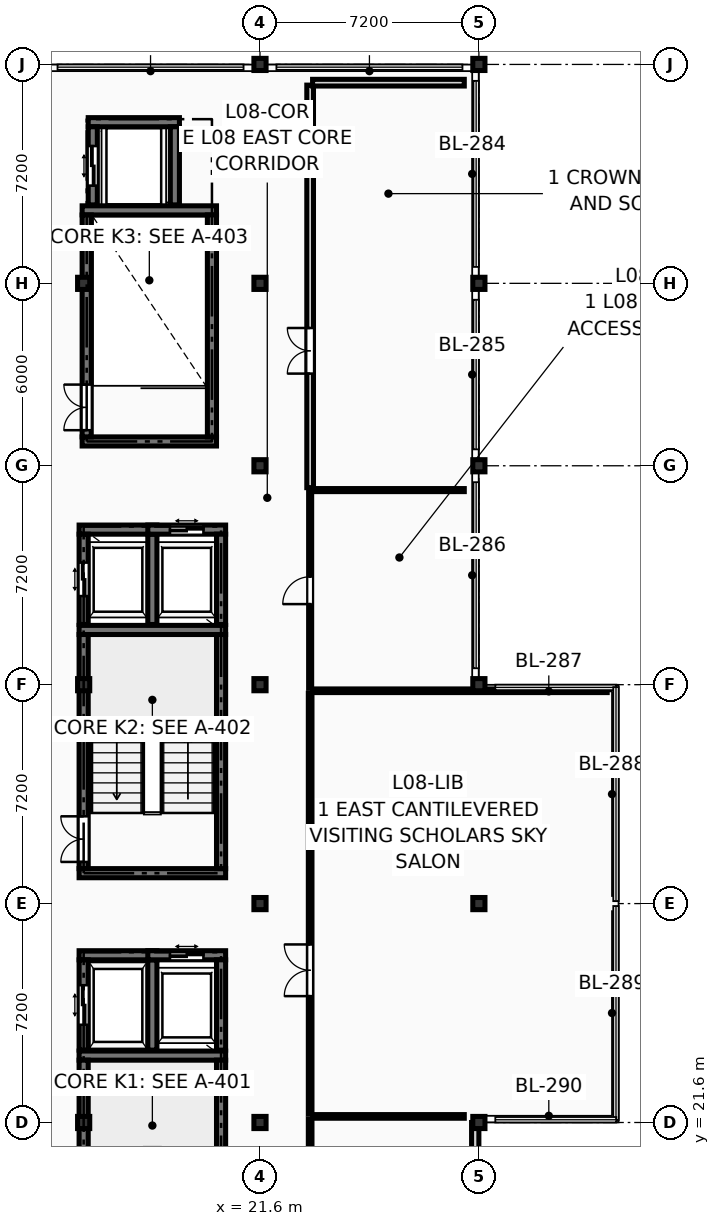
"""IFC4 building model, lengths in metres.
Left out: names, types, materials, properties, quantities, classifications, styles, units other than length and angle.
Written with IfcOpenShell. Run it as: python <this file> out.ifc"""

import sys

from ifc_helpers import new_model, si_unit, direction, frame, frame_2d, origin, origin_2d, place, context, subcontext, project, spatial, rectangle, extrude, element, fill, save


model = new_model("IFC4")
c1 = context("Model", 3, precision=1e-05, world=origin(), true_north=direction((0.0, 1.0)))
c2 = subcontext(c1, "Body", "Model", "MODEL_VIEW")
j1 = project(units=[si_unit("LENGTHUNIT", "METRE"), si_unit("PLANEANGLEUNIT", "RADIAN")], contexts=[c1])
p1 = place(None, origin())
s1 = spatial("IfcSite", under=j1, at=p1, CompositionType="ELEMENT")
p2 = place(p1, origin())
s2 = spatial("IfcBuilding", under=s1, at=p2, CompositionType="ELEMENT")
p3 = place(p2, frame((0.0, 0.0, 29.7)))
s3 = spatial("IfcBuildingStorey", under=s2, at=p3, CompositionType="ELEMENT", Elevation=29.7)
for number, where, z_axis, x_axis in (
    (1, (15.8, 21.6, 0.0), (0.0, 0.0, 1.0), (1.0, 0.0, 0.0)),
    (2, (15.8, 36.0, 0.0), (0.0, 0.0, 1.0), (1.0, 0.0, 0.0)),
    (3, (15.8, 49.2, 0.0), (0.0, 0.0, 1.0), (1.0, 0.0, 0.0)),
    (4, (21.6, 21.6, 0.0), (0.0, 0.0, 1.0), (1.0, 0.0, 0.0)),
    (5, (21.6, 28.8, 0.0), (0.0, 0.0, 1.0), (1.0, 0.0, 0.0)),
    (6, (21.6, 36.0, 0.0), (0.0, 0.0, 1.0), (1.0, 0.0, 0.0)),
    (7, (21.6, 43.2, 0.0), (0.0, 0.0, 1.0), (1.0, 0.0, 0.0)),
    (8, (21.6, 49.2, 0.0), (0.0, 0.0, 1.0), (1.0, 0.0, 0.0)),
    (9, (21.6, 56.4, 0.0), (0.0, 0.0, 1.0), (1.0, 0.0, 0.0)),
    (10, (28.8, 21.6, 0.0), (0.0, 0.0, 1.0), (1.0, 0.0, 0.0)),
    (11, (28.8, 28.8, 0.0), (0.0, 0.0, 1.0), (1.0, 0.0, 0.0)),
    (12, (28.8, 36.0, 0.0), (0.0, 0.0, 1.0), (1.0, 0.0, 0.0)),
    (13, (28.8, 43.2, 0.0), (0.0, 0.0, 1.0), (1.0, 0.0, 0.0)),
    (14, (28.8, 49.2, 0.0), (0.0, 0.0, 1.0), (1.0, 0.0, 0.0)),
    (15, (28.8, 56.4, 0.0), (0.0, 0.0, 1.0), (1.0, 0.0, 0.0)),
):
    element("IfcColumn", number, at=place(p3, frame(where, z_axis=z_axis, x_axis=x_axis)), inside=s3, PredefinedType="COLUMN", context=c2, shape_type="SweptSolid", body=[
        extrude(rectangle(XDim=0.4, YDim=0.4, at=origin_2d()), origin(), (0.0, 0.0, 1.0), 3.6),
    ])
p4 = place(p3, frame((28.68, 14.4, 0.0), z_axis=(0.0, 0.0, 1.0), x_axis=(0.0, 1.0, 0.0)))
e16 = element("IfcWall", 16, at=p4, inside=s3, PredefinedType="SOLIDWALL", context=c2, shape_type="SweptSolid", body=[
    extrude(rectangle(XDim=7.2, YDim=0.24, at=frame_2d((3.6, 0.0))), origin(), (0.0, 0.0, 1.0), 2.85),
])
p5 = place(p4, frame((1.038, 0.0, 0.18)))
e17 = element("IfcOpeningElement", 17, at=p5, cuts=e16, PredefinedType="OPENING", context=c2, shape_type="SweptSolid", body=[
    extrude(rectangle(XDim=1.45, YDim=2.5, at=frame_2d((0.725, 1.25))), frame((0.0, 0.132, 0.0), z_axis=(0.0, -1.0, 0.0), x_axis=(1.0, 0.0, 0.0)), (0.0, 0.0, 1.0), 0.264),
])
p6 = place(p4, frame((2.875, 0.0, 0.18)))
e18 = element("IfcOpeningElement", 18, at=p6, cuts=e16, PredefinedType="OPENING", context=c2, shape_type="SweptSolid", body=[
    extrude(rectangle(XDim=1.45, YDim=2.5, at=frame_2d((0.725, 1.25))), frame((0.0, 0.132, 0.0), z_axis=(0.0, -1.0, 0.0), x_axis=(1.0, 0.0, 0.0)), (0.0, 0.0, 1.0), 0.264),
])
p7 = place(p4, frame((4.712, 0.0, 0.18)))
e19 = element("IfcOpeningElement", 19, at=p7, cuts=e16, PredefinedType="OPENING", context=c2, shape_type="SweptSolid", body=[
    extrude(rectangle(XDim=1.45, YDim=2.5, at=frame_2d((0.725, 1.25))), frame((0.0, 0.132, 0.0), z_axis=(0.0, -1.0, 0.0), x_axis=(1.0, 0.0, 0.0)), (0.0, 0.0, 1.0), 0.264),
])
p8 = place(p3, frame((15.65, 23.8, 0.0), z_axis=(0.0, 0.0, 1.0), x_axis=(1.0, 0.0, 0.0)))
e20 = element("IfcWall", 20, at=p8, inside=s3, PredefinedType="SHEAR", context=c2, shape_type="SweptSolid", body=[
    extrude(rectangle(XDim=4.82, YDim=0.3, at=frame_2d((2.41, 0.0))), origin(), (0.0, 0.0, 1.0), 3.4),
])
p9 = place(p3, frame((15.8, 15.95, 0.0), z_axis=(0.0, 0.0, 1.0), x_axis=(0.0, 1.0, 0.0)))
e21 = element("IfcWall", 21, at=p9, inside=s3, PredefinedType="SHEAR", context=c2, shape_type="SweptSolid", body=[
    extrude(rectangle(XDim=7.7, YDim=0.3, at=frame_2d((3.85, 0.0))), origin(), (0.0, 0.0, 1.0), 3.4),
])
p10 = place(p9, frame((0.22, 0.0, 0.0)))
e22 = element("IfcOpeningElement", 22, at=p10, cuts=e21, PredefinedType="OPENING", context=c2, shape_type="SweptSolid", body=[
    extrude(rectangle(XDim=1.5, YDim=2.2, at=frame_2d((0.75, 1.1))), frame((0.0, 0.162, 0.0), z_axis=(0.0, -1.0, 0.0), x_axis=(1.0, 0.0, 0.0)), (0.0, 0.0, 1.0), 0.324),
])
p11 = place(p3, frame((20.32, 15.95, 0.0), z_axis=(0.0, 0.0, 1.0), x_axis=(0.0, 1.0, 0.0)))
e23 = element("IfcWall", 23, at=p11, inside=s3, PredefinedType="SHEAR", context=c2, shape_type="SweptSolid", body=[
    extrude(rectangle(XDim=7.7, YDim=0.3, at=frame_2d((3.85, 0.0))), origin(), (0.0, 0.0, 1.0), 3.4),
])
for number, where, z_axis, x_axis in (
    (24, (15.65, 29.8, 0.0), (0.0, 0.0, 1.0), (1.0, 0.0, 0.0)),
    (25, (15.65, 37.8, 0.0), (0.0, 0.0, 1.0), (1.0, 0.0, 0.0)),
):
    element("IfcWall", number, at=place(p3, frame(where, z_axis=z_axis, x_axis=x_axis)), inside=s3, PredefinedType="SHEAR", context=c2, shape_type="SweptSolid", body=[
        extrude(rectangle(XDim=4.82, YDim=0.3, at=frame_2d((2.41, 0.0))), origin(), (0.0, 0.0, 1.0), 3.4),
    ])
p12 = place(p3, frame((15.8, 29.95, 0.0), z_axis=(0.0, 0.0, 1.0), x_axis=(0.0, 1.0, 0.0)))
e26 = element("IfcWall", 26, at=p12, inside=s3, PredefinedType="SHEAR", context=c2, shape_type="SweptSolid", body=[
    extrude(rectangle(XDim=7.7, YDim=0.3, at=frame_2d((3.85, 0.0))), origin(), (0.0, 0.0, 1.0), 3.4),
])
p13 = place(p12, frame((0.22, 0.0, 0.0)))
e27 = element("IfcOpeningElement", 27, at=p13, cuts=e26, PredefinedType="OPENING", context=c2, shape_type="SweptSolid", body=[
    extrude(rectangle(XDim=1.5, YDim=2.2, at=frame_2d((0.75, 1.1))), frame((0.0, 0.162, 0.0), z_axis=(0.0, -1.0, 0.0), x_axis=(1.0, 0.0, 0.0)), (0.0, 0.0, 1.0), 0.324),
])
p14 = place(p3, frame((20.32, 29.95, 0.0), z_axis=(0.0, 0.0, 1.0), x_axis=(0.0, 1.0, 0.0)))
e28 = element("IfcWall", 28, at=p14, inside=s3, PredefinedType="SHEAR", context=c2, shape_type="SweptSolid", body=[
    extrude(rectangle(XDim=7.7, YDim=0.3, at=frame_2d((3.85, 0.0))), origin(), (0.0, 0.0, 1.0), 3.4),
])
for number, where, z_axis, x_axis in (
    (29, (15.75, 44.0, 0.0), (0.0, 0.0, 1.0), (1.0, 0.0, 0.0)),
    (30, (15.75, 51.6, 0.0), (0.0, 0.0, 1.0), (1.0, 0.0, 0.0)),
):
    element("IfcWall", number, at=place(p3, frame(where, z_axis=z_axis, x_axis=x_axis)), inside=s3, PredefinedType="SHEAR", context=c2, shape_type="SweptSolid", body=[
        extrude(rectangle(XDim=4.42, YDim=0.3, at=frame_2d((2.21, 0.0))), origin(), (0.0, 0.0, 1.0), 3.4),
    ])
p15 = place(p3, frame((15.9, 44.15, 0.0), z_axis=(0.0, 0.0, 1.0), x_axis=(0.0, 1.0, 0.0)))
e31 = element("IfcWall", 31, at=p15, inside=s3, PredefinedType="SHEAR", context=c2, shape_type="SweptSolid", body=[
    extrude(rectangle(XDim=7.3, YDim=0.3, at=frame_2d((3.65, 0.0))), origin(), (0.0, 0.0, 1.0), 3.4),
])
p16 = place(p15, frame((0.22, 0.0, 0.0)))
e32 = element("IfcOpeningElement", 32, at=p16, cuts=e31, PredefinedType="OPENING", context=c2, shape_type="SweptSolid", body=[
    extrude(rectangle(XDim=1.5, YDim=2.2, at=frame_2d((0.75, 1.1))), frame((0.0, 0.162, 0.0), z_axis=(0.0, -1.0, 0.0), x_axis=(1.0, 0.0, 0.0)), (0.0, 0.0, 1.0), 0.324),
])
p17 = place(p3, frame((20.02, 44.15, 0.0), z_axis=(0.0, 0.0, 1.0), x_axis=(0.0, 1.0, 0.0)))
e33 = element("IfcWall", 33, at=p17, inside=s3, PredefinedType="SHEAR", context=c2, shape_type="SweptSolid", body=[
    extrude(rectangle(XDim=7.3, YDim=0.3, at=frame_2d((3.65, 0.0))), origin(), (0.0, 0.0, 1.0), 3.4),
])
p18 = place(p3, frame((15.65, 27.1, 0.0), z_axis=(0.0, 0.0, 1.0), x_axis=(1.0, 0.0, 0.0)))
e34 = element("IfcWall", 34, at=p18, inside=s3, PredefinedType="SHEAR", context=c2, shape_type="SweptSolid", body=[
    extrude(rectangle(XDim=2.56, YDim=0.3, at=frame_2d((1.28, 0.0))), origin(), (0.0, 0.0, 1.0), 3.4),
])
p19 = place(p3, frame((15.8, 23.98, 0.0), z_axis=(0.0, 0.0, 1.0), x_axis=(0.0, 1.0, 0.0)))
e35 = element("IfcWall", 35, at=p19, inside=s3, PredefinedType="SHEAR", context=c2, shape_type="SweptSolid", body=[
    extrude(rectangle(XDim=2.97, YDim=0.3, at=frame_2d((1.485, 0.0))), origin(), (0.0, 0.0, 1.0), 3.4),
])
p20 = place(p19, frame((0.835, 0.0, 0.0)))
e36 = element("IfcOpeningElement", 36, at=p20, cuts=e35, PredefinedType="OPENING", context=c2, shape_type="SweptSolid", body=[
    extrude(rectangle(XDim=1.3, YDim=2.25, at=frame_2d((0.65, 1.125))), frame((0.0, 0.162, 0.0), z_axis=(0.0, -1.0, 0.0), x_axis=(1.0, 0.0, 0.0)), (0.0, 0.0, 1.0), 0.324),
])
p21 = place(p3, frame((18.06, 23.98, 0.0), z_axis=(0.0, 0.0, 1.0), x_axis=(0.0, 1.0, 0.0)))
e37 = element("IfcWall", 37, at=p21, inside=s3, PredefinedType="SHEAR", context=c2, shape_type="SweptSolid", body=[
    extrude(rectangle(XDim=2.97, YDim=0.3, at=frame_2d((1.485, 0.0))), origin(), (0.0, 0.0, 1.0), 3.4),
])
p22 = place(p3, frame((17.91, 27.1, 0.0), z_axis=(0.0, 0.0, 1.0), x_axis=(1.0, 0.0, 0.0)))
e38 = element("IfcWall", 38, at=p22, inside=s3, PredefinedType="SHEAR", context=c2, shape_type="SweptSolid", body=[
    extrude(rectangle(XDim=2.56, YDim=0.3, at=frame_2d((1.28, 0.0))), origin(), (0.0, 0.0, 1.0), 3.4),
])
p23 = place(p22, frame((0.73, 0.0, 0.0)))
e39 = element("IfcOpeningElement", 39, at=p23, cuts=e38, PredefinedType="OPENING", context=c2, shape_type="SweptSolid", body=[
    extrude(rectangle(XDim=1.1, YDim=2.2, at=frame_2d((0.55, 1.1))), frame((0.0, 0.162, 0.0), z_axis=(0.0, -1.0, 0.0), x_axis=(1.0, 0.0, 0.0)), (0.0, 0.0, 1.0), 0.324),
])
p24 = place(p3, frame((20.32, 23.98, 0.0), z_axis=(0.0, 0.0, 1.0), x_axis=(0.0, 1.0, 0.0)))
e40 = element("IfcWall", 40, at=p24, inside=s3, PredefinedType="SHEAR", context=c2, shape_type="SweptSolid", body=[
    extrude(rectangle(XDim=2.97, YDim=0.3, at=frame_2d((1.485, 0.0))), origin(), (0.0, 0.0, 1.0), 3.4),
])
p25 = place(p3, frame((15.65, 41.1, 0.0), z_axis=(0.0, 0.0, 1.0), x_axis=(1.0, 0.0, 0.0)))
e41 = element("IfcWall", 41, at=p25, inside=s3, PredefinedType="SHEAR", context=c2, shape_type="SweptSolid", body=[
    extrude(rectangle(XDim=2.56, YDim=0.3, at=frame_2d((1.28, 0.0))), origin(), (0.0, 0.0, 1.0), 3.4),
])
p26 = place(p3, frame((15.8, 37.98, 0.0), z_axis=(0.0, 0.0, 1.0), x_axis=(0.0, 1.0, 0.0)))
e42 = element("IfcWall", 42, at=p26, inside=s3, PredefinedType="SHEAR", context=c2, shape_type="SweptSolid", body=[
    extrude(rectangle(XDim=2.97, YDim=0.3, at=frame_2d((1.485, 0.0))), origin(), (0.0, 0.0, 1.0), 3.4),
])
p27 = place(p26, frame((0.935, 0.0, 0.0)))
e43 = element("IfcOpeningElement", 43, at=p27, cuts=e42, PredefinedType="OPENING", context=c2, shape_type="SweptSolid", body=[
    extrude(rectangle(XDim=1.1, YDim=2.2, at=frame_2d((0.55, 1.1))), frame((0.0, 0.162, 0.0), z_axis=(0.0, -1.0, 0.0), x_axis=(1.0, 0.0, 0.0)), (0.0, 0.0, 1.0), 0.324),
])
p28 = place(p3, frame((18.06, 37.98, 0.0), z_axis=(0.0, 0.0, 1.0), x_axis=(0.0, 1.0, 0.0)))
e44 = element("IfcWall", 44, at=p28, inside=s3, PredefinedType="SHEAR", context=c2, shape_type="SweptSolid", body=[
    extrude(rectangle(XDim=2.97, YDim=0.3, at=frame_2d((1.485, 0.0))), origin(), (0.0, 0.0, 1.0), 3.4),
])
p29 = place(p3, frame((17.91, 41.1, 0.0), z_axis=(0.0, 0.0, 1.0), x_axis=(1.0, 0.0, 0.0)))
e45 = element("IfcWall", 45, at=p29, inside=s3, PredefinedType="SHEAR", context=c2, shape_type="SweptSolid", body=[
    extrude(rectangle(XDim=2.56, YDim=0.3, at=frame_2d((1.28, 0.0))), origin(), (0.0, 0.0, 1.0), 3.4),
])
p30 = place(p29, frame((0.73, 0.0, 0.0)))
e46 = element("IfcOpeningElement", 46, at=p30, cuts=e45, PredefinedType="OPENING", context=c2, shape_type="SweptSolid", body=[
    extrude(rectangle(XDim=1.1, YDim=2.2, at=frame_2d((0.55, 1.1))), frame((0.0, 0.162, 0.0), z_axis=(0.0, -1.0, 0.0), x_axis=(1.0, 0.0, 0.0)), (0.0, 0.0, 1.0), 0.324),
])
p31 = place(p3, frame((20.32, 37.98, 0.0), z_axis=(0.0, 0.0, 1.0), x_axis=(0.0, 1.0, 0.0)))
e47 = element("IfcWall", 47, at=p31, inside=s3, PredefinedType="SHEAR", context=c2, shape_type="SweptSolid", body=[
    extrude(rectangle(XDim=2.97, YDim=0.3, at=frame_2d((1.485, 0.0))), origin(), (0.0, 0.0, 1.0), 3.4),
])
p32 = place(p3, frame((15.95, 54.5, 0.0), z_axis=(0.0, 0.0, 1.0), x_axis=(1.0, 0.0, 0.0)))
e48 = element("IfcWall", 48, at=p32, inside=s3, PredefinedType="SHEAR", context=c2, shape_type="SweptSolid", body=[
    extrude(rectangle(XDim=3.0, YDim=0.3, at=frame_2d((1.5, 0.0))), origin(), (0.0, 0.0, 1.0), 3.4),
])
p33 = place(p3, frame((16.1, 51.78, 0.0), z_axis=(0.0, 0.0, 1.0), x_axis=(0.0, 1.0, 0.0)))
e49 = element("IfcWall", 49, at=p33, inside=s3, PredefinedType="SHEAR", context=c2, shape_type="SweptSolid", body=[
    extrude(rectangle(XDim=2.57, YDim=0.3, at=frame_2d((1.285, 0.0))), origin(), (0.0, 0.0, 1.0), 3.4),
])
p34 = place(p33, frame((0.635, 0.0, 0.0)))
e50 = element("IfcOpeningElement", 50, at=p34, cuts=e49, PredefinedType="OPENING", context=c2, shape_type="SweptSolid", body=[
    extrude(rectangle(XDim=1.3, YDim=2.25, at=frame_2d((0.65, 1.125))), frame((0.0, 0.162, 0.0), z_axis=(0.0, -1.0, 0.0), x_axis=(1.0, 0.0, 0.0)), (0.0, 0.0, 1.0), 0.324),
])
p35 = place(p3, frame((18.8, 51.78, 0.0), z_axis=(0.0, 0.0, 1.0), x_axis=(0.0, 1.0, 0.0)))
e51 = element("IfcWall", 51, at=p35, inside=s3, PredefinedType="SHEAR", context=c2, shape_type="SweptSolid", body=[
    extrude(rectangle(XDim=2.57, YDim=0.3, at=frame_2d((1.285, 0.0))), origin(), (0.0, 0.0, 1.0), 3.4),
])
p36 = place(p3, frame((23.25, 14.88, 0.0), z_axis=(0.0, 0.0, 1.0), x_axis=(0.0, 1.0, 0.0)))
e52 = element("IfcWall", 52, at=p36, inside=s3, PredefinedType="PARTITIONING", context=c2, shape_type="SweptSolid", body=[
    extrude(rectangle(XDim=6.84, YDim=0.12, at=frame_2d((3.42, 0.0))), origin(), (0.0, 0.0, 1.0), 3.385),
])
p37 = place(p36, frame((2.895, 0.0, 0.0)))
e53 = element("IfcOpeningElement", 53, at=p37, cuts=e52, PredefinedType="OPENING", context=c2, shape_type="SweptSolid", body=[
    extrude(rectangle(XDim=1.05, YDim=2.18, at=frame_2d((0.525, 1.09))), frame((0.0, 0.072, 0.0), z_axis=(0.0, -1.0, 0.0), x_axis=(1.0, 0.0, 0.0)), (0.0, 0.0, 1.0), 0.144),
])
p38 = place(p3, frame((23.33, 21.8, 0.0), z_axis=(0.0, 0.0, 1.0), x_axis=(1.0, 0.0, 0.0)))
e54 = element("IfcWall", 54, at=p38, inside=s3, PredefinedType="PARTITIONING", context=c2, shape_type="SweptSolid", body=[
    extrude(rectangle(XDim=4.99, YDim=0.12, at=frame_2d((2.495, 0.0))), origin(), (0.0, 0.0, 1.0), 2.701),
])
p39 = place(p3, frame((23.25, 21.88, 0.0), z_axis=(0.0, 0.0, 1.0), x_axis=(0.0, 1.0, 0.0)))
e55 = element("IfcWall", 55, at=p39, inside=s3, PredefinedType="PARTITIONING", context=c2, shape_type="SweptSolid", body=[
    extrude(rectangle(XDim=13.84, YDim=0.12, at=frame_2d((6.92, 0.0))), origin(), (0.0, 0.0, 1.0), 3.385),
])
p40 = place(p39, frame((3.876, 0.0, 0.0)))
e56 = element("IfcOpeningElement", 56, at=p40, cuts=e55, PredefinedType="OPENING", context=c2, shape_type="SweptSolid", body=[
    extrude(rectangle(XDim=1.7, YDim=2.28, at=frame_2d((0.85, 1.14))), frame((0.0, 0.072, 0.0), z_axis=(0.0, -1.0, 0.0), x_axis=(1.0, 0.0, 0.0)), (0.0, 0.0, 1.0), 0.144),
])
p41 = place(p3, frame((23.33, 35.8, 0.0), z_axis=(0.0, 0.0, 1.0), x_axis=(1.0, 0.0, 0.0)))
e57 = element("IfcWall", 57, at=p41, inside=s3, PredefinedType="PARTITIONING", context=c2, shape_type="SweptSolid", body=[
    extrude(rectangle(XDim=9.69, YDim=0.12, at=frame_2d((4.845, 0.0))), origin(), (0.0, 0.0, 1.0), 2.701),
])
p42 = place(p3, frame((23.25, 35.88, 0.0), z_axis=(0.0, 0.0, 1.0), x_axis=(0.0, 1.0, 0.0)))
e58 = element("IfcWall", 58, at=p42, inside=s3, PredefinedType="PARTITIONING", context=c2, shape_type="SweptSolid", body=[
    extrude(rectangle(XDim=6.44, YDim=0.1, at=frame_2d((3.22, 0.0))), origin(), (0.0, 0.0, 1.0), 3.385),
])
p43 = place(p42, frame((2.77, 0.0, 0.0)))
e59 = element("IfcOpeningElement", 59, at=p43, cuts=e58, PredefinedType="OPENING", context=c2, shape_type="SweptSolid", body=[
    extrude(rectangle(XDim=0.9, YDim=2.1, at=frame_2d((0.45, 1.05))), frame((0.0, 0.062, 0.0), z_axis=(0.0, -1.0, 0.0), x_axis=(1.0, 0.0, 0.0)), (0.0, 0.0, 1.0), 0.124),
])
p44 = place(p3, frame((23.33, 42.4, 0.0), z_axis=(0.0, 0.0, 1.0), x_axis=(1.0, 0.0, 0.0)))
e60 = element("IfcWall", 60, at=p44, inside=s3, PredefinedType="PARTITIONING", context=c2, shape_type="SweptSolid", body=[
    extrude(rectangle(XDim=4.99, YDim=0.1, at=frame_2d((2.495, 0.0))), origin(), (0.0, 0.0, 1.0), 3.385),
])
p45 = place(p3, frame((23.25, 42.48, 0.0), z_axis=(0.0, 0.0, 1.0), x_axis=(0.0, 1.0, 0.0)))
e61 = element("IfcWall", 61, at=p45, inside=s3, PredefinedType="PARTITIONING", context=c2, shape_type="SweptSolid", body=[
    extrude(rectangle(XDim=13.24, YDim=0.22, at=frame_2d((6.62, 0.0))), origin(), (0.0, 0.0, 1.0), 3.385),
])
p46 = place(p45, frame((3.751, 0.0, 0.0)))
e62 = element("IfcOpeningElement", 62, at=p46, cuts=e61, PredefinedType="OPENING", context=c2, shape_type="SweptSolid", body=[
    extrude(rectangle(XDim=1.5, YDim=2.25, at=frame_2d((0.75, 1.125))), frame((0.0, 0.122, 0.0), z_axis=(0.0, -1.0, 0.0), x_axis=(1.0, 0.0, 0.0)), (0.0, 0.0, 1.0), 0.244),
])
p47 = place(p3, frame((23.33, 55.8, 0.0), z_axis=(0.0, 0.0, 1.0), x_axis=(1.0, 0.0, 0.0)))
e63 = element("IfcWall", 63, at=p47, inside=s3, PredefinedType="PARTITIONING", context=c2, shape_type="SweptSolid", body=[
    extrude(rectangle(XDim=4.99, YDim=0.22, at=frame_2d((2.495, 0.0))), origin(), (0.0, 0.0, 1.0), 3.385),
])
p48 = place(p13, origin())
e64 = element("IfcDoor", 64, at=p48, inside=s3, OperationType="DOUBLE_DOOR_SINGLE_SWING", PredefinedType="DOOR", context=c2, shape_type="SweptSolid", body=[
    extrude(rectangle(XDim=1.5, YDim=2.2, at=frame_2d((0.75, 1.1))), frame((0.0, 0.025, 0.0), z_axis=(0.0, -1.0, 0.0), x_axis=(1.0, 0.0, 0.0)), (0.0, 0.0, 1.0), 0.05),
])
fill(e27, e64)
p49 = place(p16, origin())
e65 = element("IfcDoor", 65, at=p49, inside=s3, OperationType="DOUBLE_DOOR_SINGLE_SWING", PredefinedType="DOOR", context=c2, shape_type="SweptSolid", body=[
    extrude(rectangle(XDim=1.5, YDim=2.2, at=frame_2d((0.75, 1.1))), frame((0.0, 0.025, 0.0), z_axis=(0.0, -1.0, 0.0), x_axis=(1.0, 0.0, 0.0)), (0.0, 0.0, 1.0), 0.05),
])
fill(e32, e65)
p50 = place(p20, origin())
e66 = element("IfcDoor", 66, at=p50, inside=s3, OperationType="DOUBLE_DOOR_SLIDING", PredefinedType="DOOR", context=c2, shape_type="SweptSolid", body=[
    extrude(rectangle(XDim=1.3, YDim=2.25, at=frame_2d((0.65, 1.125))), frame((0.0, 0.025, 0.0), z_axis=(0.0, -1.0, 0.0), x_axis=(1.0, 0.0, 0.0)), (0.0, 0.0, 1.0), 0.05),
])
fill(e36, e66)
p51 = place(p23, origin())
e67 = element("IfcDoor", 67, at=p51, inside=s3, OperationType="DOUBLE_DOOR_SLIDING", PredefinedType="DOOR", context=c2, shape_type="SweptSolid", body=[
    extrude(rectangle(XDim=1.1, YDim=2.2, at=frame_2d((0.55, 1.1))), frame((0.0, 0.025, 0.0), z_axis=(0.0, -1.0, 0.0), x_axis=(1.0, 0.0, 0.0)), (0.0, 0.0, 1.0), 0.05),
])
fill(e39, e67)
p52 = place(p27, origin())
e68 = element("IfcDoor", 68, at=p52, inside=s3, OperationType="DOUBLE_DOOR_SLIDING", PredefinedType="DOOR", context=c2, shape_type="SweptSolid", body=[
    extrude(rectangle(XDim=1.1, YDim=2.2, at=frame_2d((0.55, 1.1))), frame((0.0, 0.025, 0.0), z_axis=(0.0, -1.0, 0.0), x_axis=(1.0, 0.0, 0.0)), (0.0, 0.0, 1.0), 0.05),
])
fill(e43, e68)
p53 = place(p30, origin())
e69 = element("IfcDoor", 69, at=p53, inside=s3, OperationType="DOUBLE_DOOR_SLIDING", PredefinedType="DOOR", context=c2, shape_type="SweptSolid", body=[
    extrude(rectangle(XDim=1.1, YDim=2.2, at=frame_2d((0.55, 1.1))), frame((0.0, 0.025, 0.0), z_axis=(0.0, -1.0, 0.0), x_axis=(1.0, 0.0, 0.0)), (0.0, 0.0, 1.0), 0.05),
])
fill(e46, e69)
p54 = place(p34, origin())
e70 = element("IfcDoor", 70, at=p54, inside=s3, OperationType="DOUBLE_DOOR_SLIDING", PredefinedType="DOOR", context=c2, shape_type="SweptSolid", body=[
    extrude(rectangle(XDim=1.3, YDim=2.25, at=frame_2d((0.65, 1.125))), frame((0.0, 0.025, 0.0), z_axis=(0.0, -1.0, 0.0), x_axis=(1.0, 0.0, 0.0)), (0.0, 0.0, 1.0), 0.05),
])
fill(e50, e70)
p55 = place(p40, origin())
e71 = element("IfcDoor", 71, at=p55, inside=s3, OperationType="DOUBLE_DOOR_SINGLE_SWING", PredefinedType="DOOR", context=c2, shape_type="SweptSolid", body=[
    extrude(rectangle(XDim=1.7, YDim=2.28, at=frame_2d((0.85, 1.14))), frame((0.0, 0.025, 0.0), z_axis=(0.0, -1.0, 0.0), x_axis=(1.0, 0.0, 0.0)), (0.0, 0.0, 1.0), 0.05),
])
fill(e56, e71)
p56 = place(p43, origin())
e72 = element("IfcDoor", 72, at=p56, inside=s3, OperationType="SINGLE_SWING_LEFT", PredefinedType="DOOR", context=c2, shape_type="SweptSolid", body=[
    extrude(rectangle(XDim=0.9, YDim=2.1, at=frame_2d((0.45, 1.05))), frame((0.0, 0.025, 0.0), z_axis=(0.0, -1.0, 0.0), x_axis=(1.0, 0.0, 0.0)), (0.0, 0.0, 1.0), 0.05),
])
fill(e59, e72)
p57 = place(p46, origin())
e73 = element("IfcDoor", 73, at=p57, inside=s3, OperationType="DOUBLE_DOOR_SINGLE_SWING", PredefinedType="DOOR", context=c2, shape_type="SweptSolid", body=[
    extrude(rectangle(XDim=1.5, YDim=2.25, at=frame_2d((0.75, 1.125))), frame((0.0, 0.025, 0.0), z_axis=(0.0, -1.0, 0.0), x_axis=(1.0, 0.0, 0.0)), (0.0, 0.0, 1.0), 0.05),
])
fill(e62, e73)
save(model, sys.argv[1])
